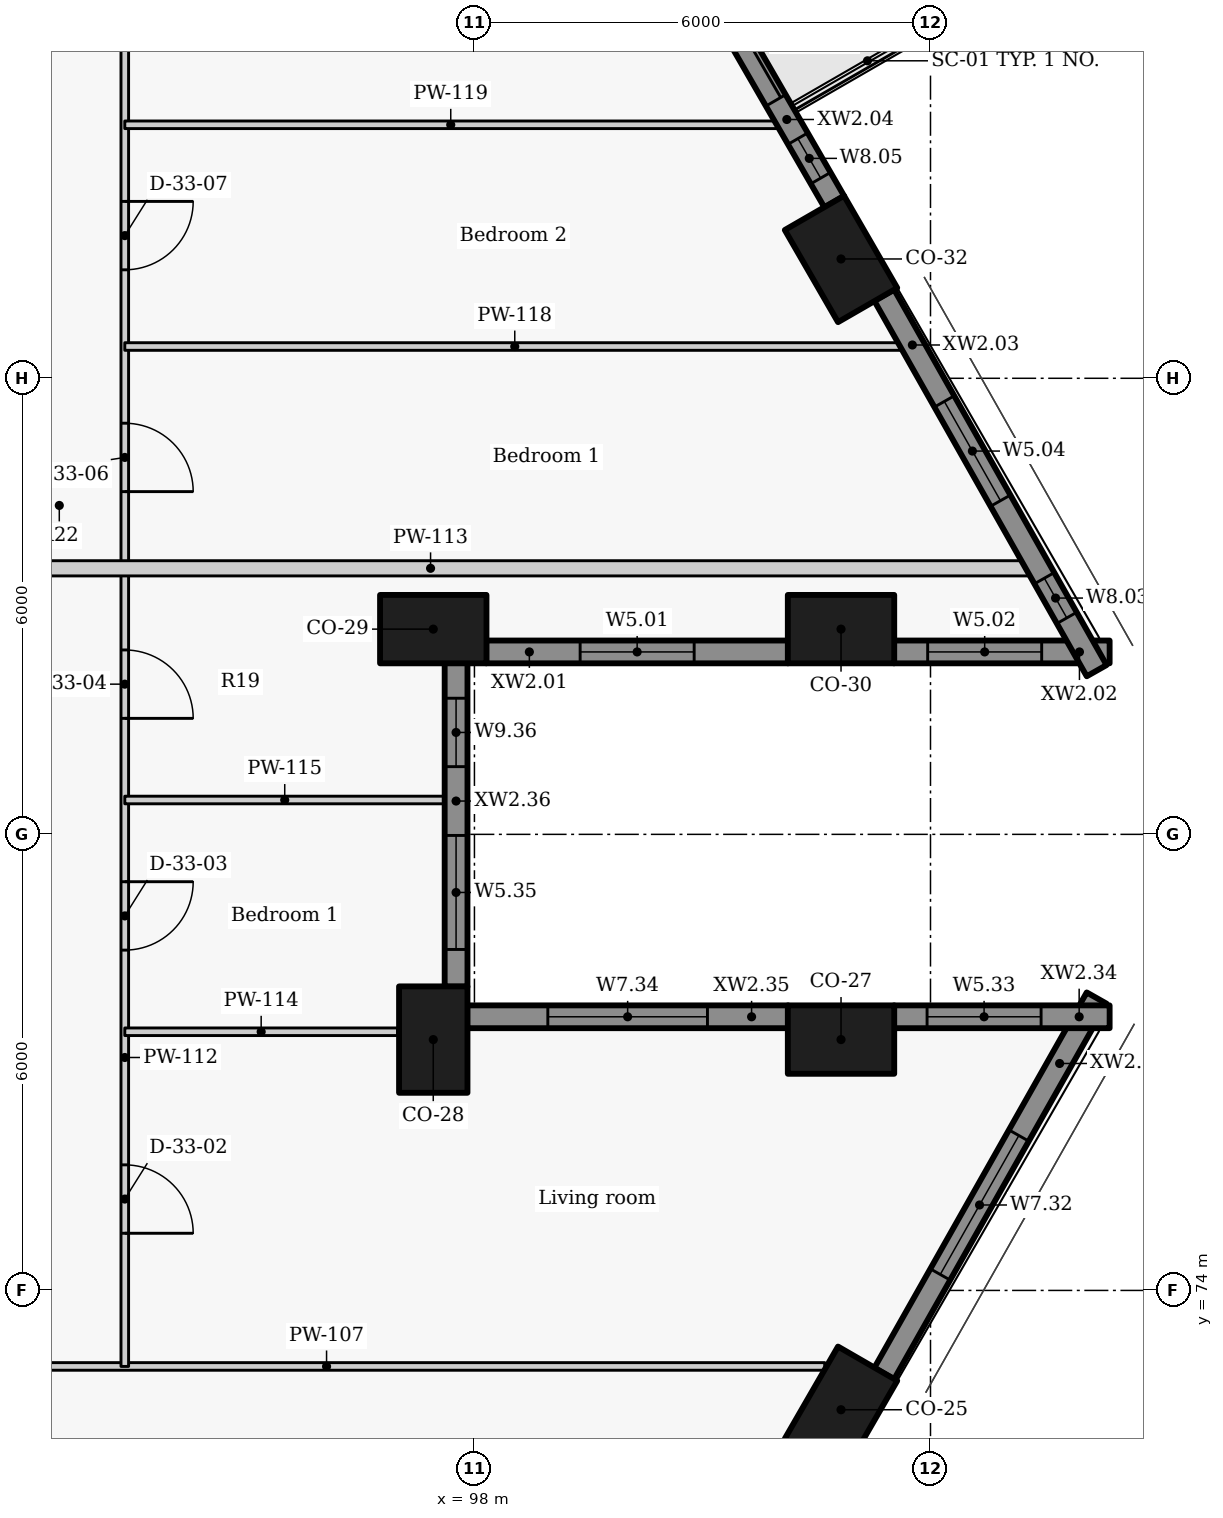
"""IFC4 building model, lengths in metres.
Left out: names, types, materials, properties, quantities, classifications, styles, units other than length and angle.
Written with IfcOpenShell. Run it as: python <this file> out.ifc"""

import sys

from ifc_helpers import new_model, si_unit, direction, frame, frame_2d, origin, origin_2d, place, context, subcontext, project, spatial, rectangle, extrude, element, fill, save


model = new_model("IFC4")
c1 = context("Model", 3, precision=1e-05, world=origin(), true_north=direction((0.0, 1.0)))
c2 = subcontext(c1, "Body", "Model", "MODEL_VIEW")
j1 = project(units=[si_unit("LENGTHUNIT", "METRE"), si_unit("PLANEANGLEUNIT", "RADIAN")], contexts=[c1])
p1 = place(None, origin())
s1 = spatial("IfcSite", under=j1, at=p1, CompositionType="ELEMENT")
p2 = place(p1, origin())
s2 = spatial("IfcBuilding", under=s1, at=p2, CompositionType="ELEMENT")
p3 = place(p2, frame((0.0, 0.0, 77.7)))
s3 = spatial("IfcBuildingStorey", under=s2, at=p3, CompositionType="ELEMENT", Elevation=77.7)
for number, where, z_axis, x_axis in (
    (1, (102.823, 72.43, 0.0), (0.0, 0.0, 1.0), (0.5, 0.866, 0.0)),
    (2, (102.823, 77.3, 0.0), (0.0, 0.0, 1.0), (-1.0, 0.0, 0.0)),
    (3, (97.458, 77.3, 0.0), (0.0, 0.0, 1.0), (0.0, 1.0, 0.0)),
    (4, (97.458, 82.7, 0.0), (0.0, 0.0, 1.0), (1.0, 0.0, 0.0)),
    (5, (102.823, 82.7, 0.0), (0.0, 0.0, 1.0), (1.0, 0.0, 0.0)),
    (6, (102.823, 87.57, 0.0), (0.0, 0.0, 1.0), (-0.5, 0.866, 0.0)),
):
    element("IfcColumn", number, at=place(p3, frame(where, z_axis=z_axis, x_axis=x_axis)), inside=s3, PredefinedType="COLUMN", context=c2, shape_type="SweptSolid", body=[
        extrude(rectangle(XDim=1.4, YDim=0.9, at=origin_2d()), origin(), (0.0, 0.0, 1.0), 3.3),
    ])
p4 = place(p3, frame((98.154, 82.4, 0.0), z_axis=(0.0, 0.0, 1.0), x_axis=(1.0, 0.0, 0.0)))
e7 = element("IfcWall", 7, at=p4, inside=s3, PredefinedType="SOLIDWALL", context=c2, shape_type="SweptSolid", body=[
    extrude(rectangle(XDim=3.973, YDim=0.3, at=frame_2d((1.986, 0.0))), origin(), (0.0, 0.0, 1.0), 2.425),
])
p5 = place(p4, frame((1.236, 0.0, 0.9)))
e8 = element("IfcOpeningElement", 8, at=p5, cuts=e7, PredefinedType="OPENING", context=c2, shape_type="SweptSolid", body=[
    extrude(rectangle(XDim=1.5, YDim=1.1, at=frame_2d((0.75, 0.55))), frame((0.0, 0.16, 0.0), z_axis=(0.0, -1.0, 0.0), x_axis=(1.0, 0.0, 0.0)), (0.0, 0.0, 1.0), 0.32),
])
p6 = place(p3, frame((103.519, 82.4, 0.0), z_axis=(0.0, 0.0, 1.0), x_axis=(1.0, 0.0, 0.0)))
e9 = element("IfcWall", 9, at=p6, inside=s3, PredefinedType="SOLIDWALL", context=c2, shape_type="SweptSolid", body=[
    extrude(rectangle(XDim=2.838, YDim=0.3, at=frame_2d((1.419, 0.0))), origin(), (0.0, 0.0, 1.0), 2.425),
])
p7 = place(p6, frame((0.444, 0.0, 0.9)))
e10 = element("IfcOpeningElement", 10, at=p7, cuts=e9, PredefinedType="OPENING", context=c2, shape_type="SweptSolid", body=[
    extrude(rectangle(XDim=1.5, YDim=1.1, at=frame_2d((0.75, 0.55))), frame((0.0, 0.16, 0.0), z_axis=(0.0, -1.0, 0.0), x_axis=(1.0, 0.0, 0.0)), (0.0, 0.0, 1.0), 0.32),
])
p8 = place(p3, frame((106.186, 82.153, 0.0), z_axis=(0.0, 0.0, 1.0), x_axis=(-0.492456858874, 0.870336855561, 0.0)))
e11 = element("IfcWall", 11, at=p8, inside=s3, PredefinedType="SOLIDWALL", context=c2, shape_type="SweptSolid", body=[
    extrude(rectangle(XDim=5.677, YDim=0.3, at=frame_2d((2.838, 0.0))), origin(), (0.0, 0.0, 1.0), 2.425),
])
p9 = place(p8, frame((0.798, 0.0, 0.9)))
e12 = element("IfcOpeningElement", 12, at=p9, cuts=e11, PredefinedType="OPENING", context=c2, shape_type="SweptSolid", body=[
    extrude(rectangle(XDim=0.6, YDim=1.1, at=frame_2d((0.3, 0.55))), frame((0.0, 0.16, 0.0), z_axis=(0.0, -1.0, 0.0), x_axis=(1.0, 0.0, 0.0)), (0.0, 0.0, 1.0), 0.32),
])
p10 = place(p8, frame((2.57, 0.0, 0.9)))
e13 = element("IfcOpeningElement", 13, at=p10, cuts=e11, PredefinedType="OPENING", context=c2, shape_type="SweptSolid", body=[
    extrude(rectangle(XDim=1.5, YDim=1.1, at=frame_2d((0.75, 0.55))), frame((0.0, 0.16, 0.0), z_axis=(0.0, -1.0, 0.0), x_axis=(1.0, 0.0, 0.0)), (0.0, 0.0, 1.0), 0.32),
])
p11 = place(p3, frame((102.735, 88.323, 0.0), z_axis=(0.0, 0.0, 1.0), x_axis=(-0.500009139881, 0.866020126807, 0.0)))
e14 = element("IfcWall", 14, at=p11, inside=s3, PredefinedType="SOLIDWALL", context=c2, shape_type="SweptSolid", body=[
    extrude(rectangle(XDim=3.637, YDim=0.3, at=frame_2d((1.818, 0.0))), origin(), (0.0, 0.0, 1.0), 2.425),
])
p12 = place(p11, frame((1.54, 0.0, 0.0)))
e15 = element("IfcOpeningElement", 15, at=p12, cuts=e14, PredefinedType="OPENING", context=c2, shape_type="SweptSolid", body=[
    extrude(rectangle(XDim=1.8, YDim=2.0, at=frame_2d((0.9, 1.0))), frame((0.0, 0.16, 0.0), z_axis=(0.0, -1.0, 0.0), x_axis=(1.0, 0.0, 0.0)), (0.0, 0.0, 1.0), 0.32),
])
p13 = place(p11, frame((0.359, 0.0, 0.9)))
e16 = element("IfcOpeningElement", 16, at=p13, cuts=e14, PredefinedType="OPENING", context=c2, shape_type="SweptSolid", body=[
    extrude(rectangle(XDim=0.6, YDim=1.1, at=frame_2d((0.3, 0.55))), frame((0.0, 0.16, 0.0), z_axis=(0.0, -1.0, 0.0), x_axis=(1.0, 0.0, 0.0)), (0.0, 0.0, 1.0), 0.32),
])
p14 = place(p3, frame((103.391, 72.906, 0.0), z_axis=(0.0, 0.0, 1.0), x_axis=(0.492456858874, 0.870336855561, 0.0)))
e17 = element("IfcWall", 17, at=p14, inside=s3, PredefinedType="SOLIDWALL", context=c2, shape_type="SweptSolid", body=[
    extrude(rectangle(XDim=5.677, YDim=0.3, at=frame_2d((2.838, 0.0))), origin(), (0.0, 0.0, 1.0), 2.425),
])
p15 = place(p14, frame((1.498, 0.0, 0.9)))
e18 = element("IfcOpeningElement", 18, at=p15, cuts=e17, PredefinedType="OPENING", context=c2, shape_type="SweptSolid", body=[
    extrude(rectangle(XDim=2.1, YDim=1.1, at=frame_2d((1.05, 0.55))), frame((0.0, 0.16, 0.0), z_axis=(0.0, -1.0, 0.0), x_axis=(1.0, 0.0, 0.0)), (0.0, 0.0, 1.0), 0.32),
])
p16 = place(p3, frame((106.357, 77.6, 0.0), z_axis=(0.0, 0.0, 1.0), x_axis=(-1.0, 0.0, 0.0)))
e19 = element("IfcWall", 19, at=p16, inside=s3, PredefinedType="SOLIDWALL", context=c2, shape_type="SweptSolid", body=[
    extrude(rectangle(XDim=2.838, YDim=0.3, at=frame_2d((1.419, 0.0))), origin(), (0.0, 0.0, 1.0), 2.425),
])
p17 = place(p16, frame((0.902, 0.0, 0.9)))
e20 = element("IfcOpeningElement", 20, at=p17, cuts=e19, PredefinedType="OPENING", context=c2, shape_type="SweptSolid", body=[
    extrude(rectangle(XDim=1.5, YDim=1.1, at=frame_2d((0.75, 0.55))), frame((0.0, 0.16, 0.0), z_axis=(0.0, -1.0, 0.0), x_axis=(1.0, 0.0, 0.0)), (0.0, 0.0, 1.0), 0.32),
])
p18 = place(p3, frame((102.127, 77.6, 0.0), z_axis=(0.0, 0.0, 1.0), x_axis=(-1.0, 0.0, 0.0)))
e21 = element("IfcWall", 21, at=p18, inside=s3, PredefinedType="SOLIDWALL", context=c2, shape_type="SweptSolid", body=[
    extrude(rectangle(XDim=4.223, YDim=0.3, at=frame_2d((2.111, 0.0))), origin(), (0.0, 0.0, 1.0), 2.425),
])
p19 = place(p18, frame((1.061, 0.0, 0.9)))
e22 = element("IfcOpeningElement", 22, at=p19, cuts=e21, PredefinedType="OPENING", context=c2, shape_type="SweptSolid", body=[
    extrude(rectangle(XDim=2.1, YDim=1.1, at=frame_2d((1.05, 0.55))), frame((0.0, 0.16, 0.0), z_axis=(0.0, -1.0, 0.0), x_axis=(1.0, 0.0, 0.0)), (0.0, 0.0, 1.0), 0.32),
])
p20 = place(p3, frame((97.758, 77.996, 0.0), z_axis=(0.0, 0.0, 1.0), x_axis=(0.0, 1.0, 0.0)))
e23 = element("IfcWall", 23, at=p20, inside=s3, PredefinedType="SOLIDWALL", context=c2, shape_type="SweptSolid", body=[
    extrude(rectangle(XDim=4.258, YDim=0.3, at=frame_2d((2.129, 0.0))), origin(), (0.0, 0.0, 1.0), 2.425),
])
p21 = place(p20, frame((0.49, 0.0, 0.9)))
e24 = element("IfcOpeningElement", 24, at=p21, cuts=e23, PredefinedType="OPENING", context=c2, shape_type="SweptSolid", body=[
    extrude(rectangle(XDim=1.5, YDim=1.1, at=frame_2d((0.75, 0.55))), frame((0.0, 0.16, 0.0), z_axis=(0.0, -1.0, 0.0), x_axis=(1.0, 0.0, 0.0)), (0.0, 0.0, 1.0), 0.32),
])
p22 = place(p20, frame((2.895, 0.0, 0.9)))
e25 = element("IfcOpeningElement", 25, at=p22, cuts=e23, PredefinedType="OPENING", context=c2, shape_type="SweptSolid", body=[
    extrude(rectangle(XDim=0.9, YDim=1.1, at=frame_2d((0.45, 0.55))), frame((0.0, 0.16, 0.0), z_axis=(0.0, -1.0, 0.0), x_axis=(1.0, 0.0, 0.0)), (0.0, 0.0, 1.0), 0.32),
])
p23 = place(p3, frame((89.5, 73.0, 0.0), z_axis=(0.0, 0.0, 1.0), x_axis=(1.0, 0.0, 0.0)))
e26 = element("IfcWall", 26, at=p23, inside=s3, PredefinedType="PARTITIONING", context=c2, shape_type="SweptSolid", body=[
    extrude(rectangle(XDim=13.109, YDim=0.1, at=frame_2d((6.555, 0.0))), origin(), (0.0, 0.0, 1.0), 2.505),
])
p24 = place(p3, frame((93.4, 93.55, 0.0), z_axis=(0.0, 0.0, 1.0), x_axis=(0.0, -1.0, 0.0)))
e27 = element("IfcWall", 27, at=p24, inside=s3, PredefinedType="PARTITIONING", context=c2, shape_type="SweptSolid", body=[
    extrude(rectangle(XDim=20.55, YDim=0.1, at=frame_2d((10.275, 0.0))), origin(), (0.0, 0.0, 1.0), 3.025),
])
p25 = place(p24, frame((17.898, 0.0, 0.0)))
e28 = element("IfcOpeningElement", 28, at=p25, cuts=e27, PredefinedType="OPENING", context=c2, shape_type="SweptSolid", body=[
    extrude(rectangle(XDim=0.9, YDim=2.1, at=frame_2d((0.45, 1.05))), frame((0.0, 0.06, 0.0), z_axis=(0.0, -1.0, 0.0), x_axis=(1.0, 0.0, 0.0)), (0.0, 0.0, 1.0), 0.12),
])
p26 = place(p24, frame((14.173, 0.0, 0.0)))
e29 = element("IfcOpeningElement", 29, at=p26, cuts=e27, PredefinedType="OPENING", context=c2, shape_type="SweptSolid", body=[
    extrude(rectangle(XDim=0.9, YDim=2.1, at=frame_2d((0.45, 1.05))), frame((0.0, 0.06, 0.0), z_axis=(0.0, -1.0, 0.0), x_axis=(1.0, 0.0, 0.0)), (0.0, 0.0, 1.0), 0.12),
])
p27 = place(p24, frame((11.124, 0.0, 0.0)))
e30 = element("IfcOpeningElement", 30, at=p27, cuts=e27, PredefinedType="OPENING", context=c2, shape_type="SweptSolid", body=[
    extrude(rectangle(XDim=0.9, YDim=2.1, at=frame_2d((0.45, 1.05))), frame((0.0, 0.06, 0.0), z_axis=(0.0, -1.0, 0.0), x_axis=(1.0, 0.0, 0.0)), (0.0, 0.0, 1.0), 0.12),
])
p28 = place(p24, frame((8.141, 0.0, 0.0)))
e31 = element("IfcOpeningElement", 31, at=p28, cuts=e27, PredefinedType="OPENING", context=c2, shape_type="SweptSolid", body=[
    extrude(rectangle(XDim=0.9, YDim=2.1, at=frame_2d((0.45, 1.05))), frame((0.0, 0.06, 0.0), z_axis=(0.0, -1.0, 0.0), x_axis=(1.0, 0.0, 0.0)), (0.0, 0.0, 1.0), 0.12),
])
p29 = place(p24, frame((5.223, 0.0, 0.0)))
e32 = element("IfcOpeningElement", 32, at=p29, cuts=e27, PredefinedType="OPENING", context=c2, shape_type="SweptSolid", body=[
    extrude(rectangle(XDim=0.9, YDim=2.1, at=frame_2d((0.45, 1.05))), frame((0.0, 0.06, 0.0), z_axis=(0.0, -1.0, 0.0), x_axis=(1.0, 0.0, 0.0)), (0.0, 0.0, 1.0), 0.12),
])
p30 = place(p24, frame((1.657, 0.0, 0.0)))
e33 = element("IfcOpeningElement", 33, at=p30, cuts=e27, PredefinedType="OPENING", context=c2, shape_type="SweptSolid", body=[
    extrude(rectangle(XDim=0.9, YDim=2.1, at=frame_2d((0.45, 1.05))), frame((0.0, 0.06, 0.0), z_axis=(0.0, -1.0, 0.0), x_axis=(1.0, 0.0, 0.0)), (0.0, 0.0, 1.0), 0.12),
])
p31 = place(p3, frame((89.5, 83.5, 0.0), z_axis=(0.0, 0.0, 1.0), x_axis=(1.0, 0.0, 0.0)))
e34 = element("IfcWall", 34, at=p31, inside=s3, PredefinedType="PARTITIONING", context=c2, shape_type="SweptSolid", body=[
    extrude(rectangle(XDim=15.846, YDim=0.2, at=frame_2d((7.923, 0.0))), origin(), (0.0, 0.0, 1.0), 2.405),
])
p32 = place(p3, frame((93.4, 77.403, 0.0), z_axis=(0.0, 0.0, 1.0), x_axis=(1.0, 0.0, 0.0)))
e35 = element("IfcWall", 35, at=p32, inside=s3, PredefinedType="PARTITIONING", context=c2, shape_type="SweptSolid", body=[
    extrude(rectangle(XDim=3.588, YDim=0.1, at=frame_2d((1.794, 0.0))), origin(), (0.0, 0.0, 1.0), 3.025),
])
p33 = place(p3, frame((93.4, 80.452, 0.0), z_axis=(0.0, 0.0, 1.0), x_axis=(1.0, 0.0, 0.0)))
e36 = element("IfcWall", 36, at=p33, inside=s3, PredefinedType="PARTITIONING", context=c2, shape_type="SweptSolid", body=[
    extrude(rectangle(XDim=4.208, YDim=0.1, at=frame_2d((2.104, 0.0))), origin(), (0.0, 0.0, 1.0), 2.405),
])
p34 = place(p3, frame((93.4, 86.418, 0.0), z_axis=(0.0, 0.0, 1.0), x_axis=(1.0, 0.0, 0.0)))
e37 = element("IfcWall", 37, at=p34, inside=s3, PredefinedType="PARTITIONING", context=c2, shape_type="SweptSolid", body=[
    extrude(rectangle(XDim=10.261, YDim=0.1, at=frame_2d((5.131, 0.0))), origin(), (0.0, 0.0, 1.0), 2.405),
])
p35 = place(p3, frame((93.4, 89.335, 0.0), z_axis=(0.0, 0.0, 1.0), x_axis=(1.0, 0.0, 0.0)))
e38 = element("IfcWall", 38, at=p35, inside=s3, PredefinedType="PARTITIONING", context=c2, shape_type="SweptSolid", body=[
    extrude(rectangle(XDim=8.577, YDim=0.1, at=frame_2d((4.288, 0.0))), origin(), (0.0, 0.0, 1.0), 2.405),
])
p36 = place(p5, origin())
e39 = element("IfcWindow", 39, at=p36, inside=s3, PartitioningType="SINGLE_PANEL", PredefinedType="WINDOW", context=c2, shape_type="SweptSolid", body=[
    extrude(rectangle(XDim=1.5, YDim=1.1, at=frame_2d((0.75, 0.55))), frame((0.0, 0.03, 0.0), z_axis=(0.0, -1.0, 0.0), x_axis=(1.0, 0.0, 0.0)), (0.0, 0.0, 1.0), 0.06),
])
fill(e8, e39)
p37 = place(p7, origin())
e40 = element("IfcWindow", 40, at=p37, inside=s3, PartitioningType="SINGLE_PANEL", PredefinedType="WINDOW", context=c2, shape_type="SweptSolid", body=[
    extrude(rectangle(XDim=1.5, YDim=1.1, at=frame_2d((0.75, 0.55))), frame((0.0, 0.03, 0.0), z_axis=(0.0, -1.0, 0.0), x_axis=(1.0, 0.0, 0.0)), (0.0, 0.0, 1.0), 0.06),
])
fill(e10, e40)
p38 = place(p9, origin())
e41 = element("IfcWindow", 41, at=p38, inside=s3, PartitioningType="SINGLE_PANEL", PredefinedType="WINDOW", context=c2, shape_type="SweptSolid", body=[
    extrude(rectangle(XDim=0.6, YDim=1.1, at=frame_2d((0.3, 0.55))), frame((0.0, 0.03, 0.0), z_axis=(0.0, -1.0, 0.0), x_axis=(1.0, 0.0, 0.0)), (0.0, 0.0, 1.0), 0.06),
])
fill(e12, e41)
p39 = place(p10, origin())
e42 = element("IfcWindow", 42, at=p39, inside=s3, PartitioningType="SINGLE_PANEL", PredefinedType="WINDOW", context=c2, shape_type="SweptSolid", body=[
    extrude(rectangle(XDim=1.5, YDim=1.1, at=frame_2d((0.75, 0.55))), frame((0.0, 0.03, 0.0), z_axis=(0.0, -1.0, 0.0), x_axis=(1.0, 0.0, 0.0)), (0.0, 0.0, 1.0), 0.06),
])
fill(e13, e42)
p40 = place(p12, origin())
e43 = element("IfcDoor", 43, at=p40, inside=s3, OperationType="SLIDING_TO_LEFT", PredefinedType="DOOR", context=c2, shape_type="SweptSolid", body=[
    extrude(rectangle(XDim=1.8, YDim=2.0, at=frame_2d((0.9, 1.0))), frame((0.0, 0.025, 0.0), z_axis=(0.0, -1.0, 0.0), x_axis=(1.0, 0.0, 0.0)), (0.0, 0.0, 1.0), 0.05),
])
fill(e15, e43)
p41 = place(p13, origin())
e44 = element("IfcWindow", 44, at=p41, inside=s3, PartitioningType="SINGLE_PANEL", PredefinedType="WINDOW", context=c2, shape_type="SweptSolid", body=[
    extrude(rectangle(XDim=0.6, YDim=1.1, at=frame_2d((0.3, 0.55))), frame((0.0, 0.03, 0.0), z_axis=(0.0, -1.0, 0.0), x_axis=(1.0, 0.0, 0.0)), (0.0, 0.0, 1.0), 0.06),
])
fill(e16, e44)
p42 = place(p15, origin())
e45 = element("IfcWindow", 45, at=p42, inside=s3, PartitioningType="SINGLE_PANEL", PredefinedType="WINDOW", context=c2, shape_type="SweptSolid", body=[
    extrude(rectangle(XDim=2.1, YDim=1.1, at=frame_2d((1.05, 0.55))), frame((0.0, 0.03, 0.0), z_axis=(0.0, -1.0, 0.0), x_axis=(1.0, 0.0, 0.0)), (0.0, 0.0, 1.0), 0.06),
])
fill(e18, e45)
p43 = place(p17, origin())
e46 = element("IfcWindow", 46, at=p43, inside=s3, PartitioningType="SINGLE_PANEL", PredefinedType="WINDOW", context=c2, shape_type="SweptSolid", body=[
    extrude(rectangle(XDim=1.5, YDim=1.1, at=frame_2d((0.75, 0.55))), frame((0.0, 0.03, 0.0), z_axis=(0.0, -1.0, 0.0), x_axis=(1.0, 0.0, 0.0)), (0.0, 0.0, 1.0), 0.06),
])
fill(e20, e46)
p44 = place(p19, origin())
e47 = element("IfcWindow", 47, at=p44, inside=s3, PartitioningType="SINGLE_PANEL", PredefinedType="WINDOW", context=c2, shape_type="SweptSolid", body=[
    extrude(rectangle(XDim=2.1, YDim=1.1, at=frame_2d((1.05, 0.55))), frame((0.0, 0.03, 0.0), z_axis=(0.0, -1.0, 0.0), x_axis=(1.0, 0.0, 0.0)), (0.0, 0.0, 1.0), 0.06),
])
fill(e22, e47)
p45 = place(p21, origin())
e48 = element("IfcWindow", 48, at=p45, inside=s3, PartitioningType="SINGLE_PANEL", PredefinedType="WINDOW", context=c2, shape_type="SweptSolid", body=[
    extrude(rectangle(XDim=1.5, YDim=1.1, at=frame_2d((0.75, 0.55))), frame((0.0, 0.03, 0.0), z_axis=(0.0, -1.0, 0.0), x_axis=(1.0, 0.0, 0.0)), (0.0, 0.0, 1.0), 0.06),
])
fill(e24, e48)
p46 = place(p22, origin())
e49 = element("IfcWindow", 49, at=p46, inside=s3, PartitioningType="SINGLE_PANEL", PredefinedType="WINDOW", context=c2, shape_type="SweptSolid", body=[
    extrude(rectangle(XDim=0.9, YDim=1.1, at=frame_2d((0.45, 0.55))), frame((0.0, 0.03, 0.0), z_axis=(0.0, -1.0, 0.0), x_axis=(1.0, 0.0, 0.0)), (0.0, 0.0, 1.0), 0.06),
])
fill(e25, e49)
p47 = place(p25, origin())
e50 = element("IfcDoor", 50, at=p47, inside=s3, OperationType="SINGLE_SWING_RIGHT", PredefinedType="DOOR", context=c2, shape_type="SweptSolid", body=[
    extrude(rectangle(XDim=0.9, YDim=2.1, at=frame_2d((0.45, 1.05))), frame((0.0, 0.025, 0.0), z_axis=(0.0, -1.0, 0.0), x_axis=(1.0, 0.0, 0.0)), (0.0, 0.0, 1.0), 0.05),
])
fill(e28, e50)
p48 = place(p26, origin())
e51 = element("IfcDoor", 51, at=p48, inside=s3, OperationType="SINGLE_SWING_LEFT", PredefinedType="DOOR", context=c2, shape_type="SweptSolid", body=[
    extrude(rectangle(XDim=0.9, YDim=2.1, at=frame_2d((0.45, 1.05))), frame((0.0, 0.025, 0.0), z_axis=(0.0, -1.0, 0.0), x_axis=(1.0, 0.0, 0.0)), (0.0, 0.0, 1.0), 0.05),
])
fill(e29, e51)
p49 = place(p27, origin())
e52 = element("IfcDoor", 52, at=p49, inside=s3, OperationType="SINGLE_SWING_RIGHT", PredefinedType="DOOR", context=c2, shape_type="SweptSolid", body=[
    extrude(rectangle(XDim=0.9, YDim=2.1, at=frame_2d((0.45, 1.05))), frame((0.0, 0.025, 0.0), z_axis=(0.0, -1.0, 0.0), x_axis=(1.0, 0.0, 0.0)), (0.0, 0.0, 1.0), 0.05),
])
fill(e30, e52)
p50 = place(p28, origin())
e53 = element("IfcDoor", 53, at=p50, inside=s3, OperationType="SINGLE_SWING_RIGHT", PredefinedType="DOOR", context=c2, shape_type="SweptSolid", body=[
    extrude(rectangle(XDim=0.9, YDim=2.1, at=frame_2d((0.45, 1.05))), frame((0.0, 0.025, 0.0), z_axis=(0.0, -1.0, 0.0), x_axis=(1.0, 0.0, 0.0)), (0.0, 0.0, 1.0), 0.05),
])
fill(e31, e53)
p51 = place(p29, origin())
e54 = element("IfcDoor", 54, at=p51, inside=s3, OperationType="SINGLE_SWING_LEFT", PredefinedType="DOOR", context=c2, shape_type="SweptSolid", body=[
    extrude(rectangle(XDim=0.9, YDim=2.1, at=frame_2d((0.45, 1.05))), frame((0.0, 0.025, 0.0), z_axis=(0.0, -1.0, 0.0), x_axis=(1.0, 0.0, 0.0)), (0.0, 0.0, 1.0), 0.05),
])
fill(e32, e54)
save(model, sys.argv[1])
